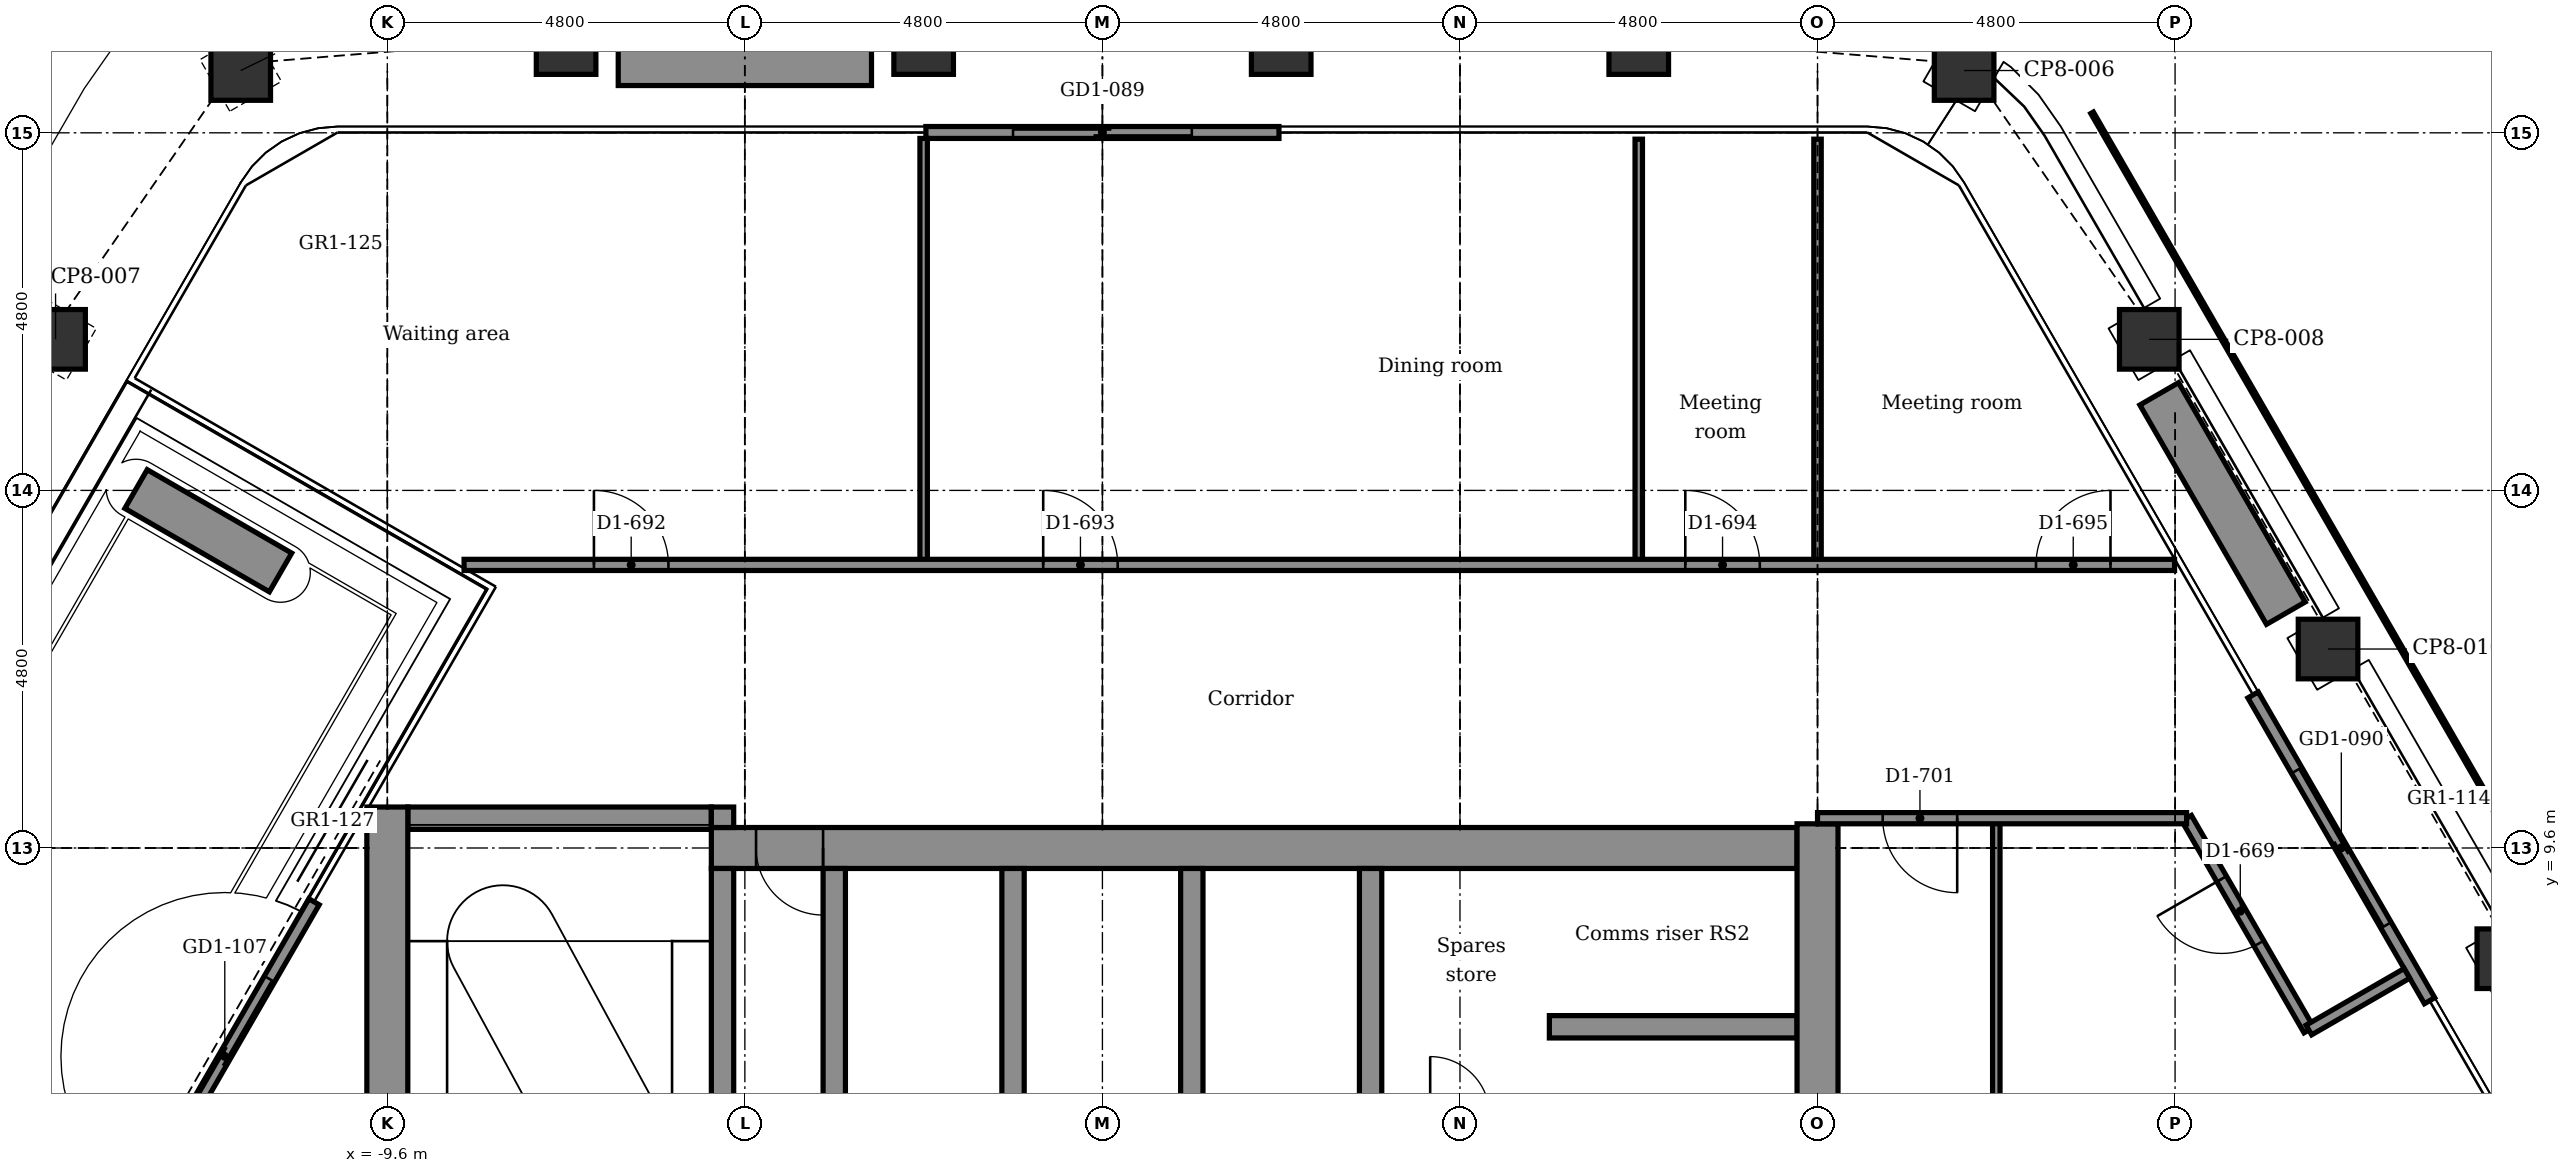
"""IFC4 building model, lengths in metres.
Left out: names, types, materials, properties, quantities, classifications, styles, units other than length and angle.
Written with IfcOpenShell. Run it as: python <this file> out.ifc"""

import sys

from ifc_helpers import new_model, si_unit, direction, frame, frame_2d, origin, origin_2d, place, context, subcontext, project, spatial, rectangle, extrude, element, fill, save


model = new_model("IFC4")
c1 = context("Model", 3, precision=1e-05, world=origin(), true_north=direction((0.0, 1.0)))
c2 = subcontext(c1, "Body", "Model", "MODEL_VIEW")
j1 = project(units=[si_unit("LENGTHUNIT", "METRE"), si_unit("PLANEANGLEUNIT", "RADIAN")], contexts=[c1])
p1 = place(None, origin())
s1 = spatial("IfcSite", under=j1, at=p1, CompositionType="ELEMENT")
p2 = place(p1, origin())
s2 = spatial("IfcBuilding", under=s1, at=p2, CompositionType="ELEMENT")
p3 = place(p2, frame((0.0, 0.0, 254.0)))
s3 = spatial("IfcBuildingStorey", under=s2, at=p3, CompositionType="ELEMENT", Elevation=254.0)
for number, where, z_axis, x_axis in (
    (1, (-11.568, 20.036, -0.15), (0.0, 0.0, 1.0), (0.866, 0.5, 0.0)),
    (2, (-7.2, 20.385, -0.15), (0.0, 0.0, 1.0), (1.0, 0.0, 0.0)),
    (3, (-2.4, 20.385, -0.15), (0.0, 0.0, 1.0), (1.0, 0.0, 0.0)),
    (4, (2.4, 20.385, -0.15), (0.0, 0.0, 1.0), (1.0, 0.0, 0.0)),
    (5, (7.2, 20.385, -0.15), (0.0, 0.0, 1.0), (1.0, 0.0, 0.0)),
    (6, (11.568, 20.036, -0.15), (0.0, 0.0, 1.0), (0.5, 0.866, 0.0)),
    (7, (14.054, 16.428, -0.15), (0.0, 0.0, 1.0), (0.866, 0.5, 0.0)),
    (8, (16.454, 12.271, -0.15), (0.0, 0.0, 1.0), (0.866, 0.5, 0.0)),
    (9, (18.854, 8.114, -0.15), (0.0, 0.0, 1.0), (0.866, 0.5, 0.0)),
    (10, (-14.054, 16.428, -0.15), (0.0, 0.0, 1.0), (0.5, 0.866, 0.0)),
):
    element("IfcColumn", number, at=place(p3, frame(where, z_axis=z_axis, x_axis=x_axis)), inside=s3, PredefinedType="COLUMN", context=c2, shape_type="SweptSolid", body=[
        extrude(rectangle(XDim=0.8, YDim=0.8, at=origin_2d()), origin(), (0.0, 0.0, 1.0), 3.9),
    ])
p4 = place(p3, frame((6.0, 7.2, -0.15), z_axis=(0.0, 0.0, 1.0), x_axis=(1.0, 0.0, 0.0)))
e11 = element("IfcWall", 11, at=p4, inside=s3, PredefinedType="STANDARD", context=c2, shape_type="SweptSolid", body=[
    extrude(rectangle(XDim=3.325, YDim=0.3, at=frame_2d((1.663, 0.0))), origin(), (0.0, 0.0, 1.0), 3.9),
])
p5 = place(p3, frame((-5.25, 9.6, -0.15), z_axis=(0.0, 0.0, 1.0), x_axis=(1.0, 0.0, 0.0)))
e12 = element("IfcWall", 12, at=p5, inside=s3, PredefinedType="SHEAR", context=c2, shape_type="SweptSolid", body=[
    extrude(rectangle(XDim=14.575, YDim=0.55, at=frame_2d((7.288, 0.0))), origin(), (0.0, 0.0, 1.0), 3.9),
])
p6 = place(p5, frame((0.6, 0.0, 0.15)))
e13 = element("IfcOpeningElement", 13, at=p6, cuts=e12, PredefinedType="OPENING", context=c2, shape_type="SweptSolid", body=[
    extrude(rectangle(XDim=0.9, YDim=2.1, at=frame_2d((0.45, 1.05))), frame((0.0, 0.285, 0.0), z_axis=(0.0, -1.0, 0.0), x_axis=(1.0, 0.0, 0.0)), (0.0, 0.0, 1.0), 0.57),
])
p7 = place(p3, frame((-9.325, 10.0, -0.15), z_axis=(0.0, 0.0, 1.0), x_axis=(1.0, 0.0, 0.0)))
e14 = element("IfcWall", 14, at=p7, inside=s3, PredefinedType="STANDARD", context=c2, shape_type="SweptSolid", body=[
    extrude(rectangle(XDim=4.075, YDim=0.3, at=frame_2d((2.038, 0.0))), origin(), (0.0, 0.0, 1.0), 3.9),
])
p8 = place(p3, frame((-9.6, 2.55, -0.15), z_axis=(0.0, 0.0, 1.0), x_axis=(0.0, 1.0, 0.0)))
e15 = element("IfcWall", 15, at=p8, inside=s3, PredefinedType="SHEAR", context=c2, shape_type="SweptSolid", body=[
    extrude(rectangle(XDim=7.6, YDim=0.55, at=frame_2d((3.8, 0.0))), origin(), (0.0, 0.0, 1.0), 3.9),
])
p9 = place(p3, frame((-5.1, 2.25, -0.15), z_axis=(0.0, 0.0, 1.0), x_axis=(0.0, 1.0, 0.0)))
e16 = element("IfcWall", 16, at=p9, inside=s3, PredefinedType="STANDARD", context=c2, shape_type="SweptSolid", body=[
    extrude(rectangle(XDim=7.075, YDim=0.3, at=frame_2d((3.538, 0.0))), origin(), (0.0, 0.0, 1.0), 3.9),
])
p10 = place(p9, frame((2.0, 0.0, 0.15)))
e17 = element("IfcOpeningElement", 17, at=p10, cuts=e16, PredefinedType="OPENING", context=c2, shape_type="SweptSolid", body=[
    extrude(rectangle(XDim=1.2, YDim=2.1, at=frame_2d((0.6, 1.05))), frame((0.0, 0.16, 0.0), z_axis=(0.0, -1.0, 0.0), x_axis=(1.0, 0.0, 0.0)), (0.0, 0.0, 1.0), 0.32),
])
p11 = place(p3, frame((-5.1, 9.875, -0.15), z_axis=(0.0, 0.0, 1.0), x_axis=(0.0, 1.0, 0.0)))
e18 = element("IfcWall", 18, at=p11, inside=s3, PredefinedType="STANDARD", context=c2, shape_type="SweptSolid", body=[
    extrude(rectangle(XDim=0.275, YDim=0.3, at=frame_2d((0.137, 0.0))), origin(), (0.0, 0.0, 1.0), 3.9),
])
for number, where, z_axis, x_axis in (
    (19, (-3.6, 5.85, -0.15), (0.0, 0.0, 1.0), (0.0, 1.0, 0.0)),
    (20, (-1.2, 5.85, -0.15), (0.0, 0.0, 1.0), (0.0, 1.0, 0.0)),
    (21, (1.2, 5.85, -0.15), (0.0, 0.0, 1.0), (0.0, 1.0, 0.0)),
    (22, (3.6, 5.85, -0.15), (0.0, 0.0, 1.0), (0.0, 1.0, 0.0)),
):
    element("IfcWall", number, at=place(p3, frame(where, z_axis=z_axis, x_axis=x_axis)), inside=s3, PredefinedType="STANDARD", context=c2, shape_type="SweptSolid", body=[
        extrude(rectangle(XDim=3.475, YDim=0.3, at=frame_2d((1.737, 0.0))), origin(), (0.0, 0.0, 1.0), 3.9),
    ])
p12 = place(p3, frame((9.6, -10.15, -0.15), z_axis=(0.0, 0.0, 1.0), x_axis=(0.0, 1.0, 0.0)))
e23 = element("IfcWall", 23, at=p12, inside=s3, PredefinedType="SHEAR", context=c2, shape_type="SweptSolid", body=[
    extrude(rectangle(XDim=20.075, YDim=0.55, at=frame_2d((10.038, 0.0))), origin(), (0.0, 0.0, 1.0), 3.9),
])
p13 = place(p3, frame((-2.37, 19.205, 0.0), z_axis=(0.0, 0.0, 1.0), x_axis=(1.0, 0.0, 0.0)))
e24 = element("IfcWall", 24, at=p13, inside=s3, PredefinedType="PARTITIONING", context=c2, shape_type="SweptSolid", body=[
    extrude(rectangle(XDim=4.74, YDim=0.16, at=frame_2d((2.37, 0.0))), origin(), (0.0, 0.0, 1.0), 3.75),
])
p14 = place(p13, frame((1.17, 0.0, 0.0)))
e25 = element("IfcOpeningElement", 25, at=p14, cuts=e24, PredefinedType="OPENING", context=c2, shape_type="SweptSolid", body=[
    extrude(rectangle(XDim=2.4, YDim=2.4, at=frame_2d((1.2, 1.2))), frame((0.0, 0.09, 0.0), z_axis=(0.0, -1.0, 0.0), x_axis=(1.0, 0.0, 0.0)), (0.0, 0.0, 1.0), 0.18),
])
p15 = place(p3, frame((15.447, 11.655, 0.0), z_axis=(0.0, 0.0, 1.0), x_axis=(0.499978080042, -0.866038058908, 0.0)))
e26 = element("IfcWall", 26, at=p15, inside=s3, PredefinedType="PARTITIONING", context=c2, shape_type="SweptSolid", body=[
    extrude(rectangle(XDim=4.74, YDim=0.16, at=frame_2d((2.37, 0.0))), origin(), (0.0, 0.0, 1.0), 3.75),
])
p16 = place(p15, frame((1.17, 0.0, 0.0)))
e27 = element("IfcOpeningElement", 27, at=p16, cuts=e26, PredefinedType="OPENING", context=c2, shape_type="SweptSolid", body=[
    extrude(rectangle(XDim=2.4, YDim=2.4, at=frame_2d((1.2, 1.2))), frame((0.0, 0.09, 0.0), z_axis=(0.0, -1.0, 0.0), x_axis=(1.0, 0.0, 0.0)), (0.0, 0.0, 1.0), 0.18),
])
p17 = place(p3, frame((-12.98, 4.727, 0.0), z_axis=(0.0, 0.0, 1.0), x_axis=(0.500011970786, 0.866018492338, 0.0)))
e28 = element("IfcWall", 28, at=p17, inside=s3, PredefinedType="PARTITIONING", context=c2, shape_type="SweptSolid", body=[
    extrude(rectangle(XDim=4.793, YDim=0.16, at=frame_2d((2.397, 0.0))), origin(), (0.0, 0.0, 1.0), 3.75),
])
p18 = place(p17, frame((1.197, 0.0, 0.0)))
e29 = element("IfcOpeningElement", 29, at=p18, cuts=e28, PredefinedType="OPENING", context=c2, shape_type="SweptSolid", body=[
    extrude(rectangle(XDim=2.4, YDim=2.4, at=frame_2d((1.2, 1.2))), frame((0.0, 0.09, 0.0), z_axis=(0.0, -1.0, 0.0), x_axis=(1.0, 0.0, 0.0)), (0.0, 0.0, 1.0), 0.18),
])
p19 = place(p3, frame((-6.5, 20.135, 0.0), z_axis=(0.0, 0.0, 1.0), x_axis=(1.0, 0.0, 0.0)))
e30 = element("IfcWall", 30, at=p19, inside=s3, PredefinedType="USERDEFINED", context=c2, shape_type="SweptSolid", body=[
    extrude(rectangle(XDim=3.4, YDim=0.6, at=frame_2d((1.7, 0.0))), origin(), (0.0, 0.0, 1.0), 0.7),
])
p20 = place(p3, frame((14.187, 15.697, 0.0), z_axis=(0.0, 0.0, 1.0), x_axis=(0.499977295307, -0.866038511948, 0.0)))
e31 = element("IfcWall", 31, at=p20, inside=s3, PredefinedType="USERDEFINED", context=c2, shape_type="SweptSolid", body=[
    extrude(rectangle(XDim=3.4, YDim=0.6, at=frame_2d((1.7, 0.0))), origin(), (0.0, 0.0, 1.0), 0.7),
])
p21 = place(p3, frame((-11.034, 13.298, 0.0), z_axis=(0.0, 0.0, 1.0), x_axis=(-0.865980463445, 0.500077830873, 0.0)))
e32 = element("IfcWall", 32, at=p21, inside=s3, PredefinedType="USERDEFINED", context=c2, shape_type="SweptSolid", body=[
    extrude(rectangle(XDim=2.24, YDim=0.6, at=frame_2d((1.12, 0.0))), origin(), (0.0, 0.0, 1.0), 0.7),
])
p22 = place(p3, frame((12.0, -10.0, 0.0), z_axis=(0.0, 0.0, 1.0), x_axis=(0.0, 1.0, 0.0)))
e33 = element("IfcWall", 33, at=p22, inside=s3, PredefinedType="PARTITIONING", context=c2, shape_type="SweptSolid", body=[
    extrude(rectangle(XDim=20.0, YDim=0.1, at=frame_2d((10.0, 0.0))), origin(), (0.0, 0.0, 1.0), 3.75),
])
p23 = place(p3, frame((9.6, 13.4, 0.0), z_axis=(0.0, 0.0, 1.0), x_axis=(0.0, 1.0, 0.0)))
e34 = element("IfcWall", 34, at=p23, inside=s3, PredefinedType="PARTITIONING", context=c2, shape_type="SweptSolid", body=[
    extrude(rectangle(XDim=5.715, YDim=0.1, at=frame_2d((2.857, 0.0))), origin(), (0.0, 0.0, 1.0), 3.217),
])
p24 = place(p3, frame((7.2, 13.4, 0.0), z_axis=(0.0, 0.0, 1.0), x_axis=(0.0, 1.0, 0.0)))
e35 = element("IfcWall", 35, at=p24, inside=s3, PredefinedType="PARTITIONING", context=c2, shape_type="SweptSolid", body=[
    extrude(rectangle(XDim=5.715, YDim=0.1, at=frame_2d((2.857, 0.0))), origin(), (0.0, 0.0, 1.0), 3.75),
])
p25 = place(p3, frame((-2.4, 13.4, 0.0), z_axis=(0.0, 0.0, 1.0), x_axis=(0.0, 1.0, 0.0)))
e36 = element("IfcWall", 36, at=p25, inside=s3, PredefinedType="PARTITIONING", context=c2, shape_type="SweptSolid", body=[
    extrude(rectangle(XDim=5.725, YDim=0.1, at=frame_2d((2.862, 0.0))), origin(), (0.0, 0.0, 1.0), 3.75),
])
p26 = place(p3, frame((14.555, 10.0, 0.0), z_axis=(0.0, 0.0, 1.0), x_axis=(0.499954196102, -0.866051847062, 0.0)))
e37 = element("IfcWall", 37, at=p26, inside=s3, PredefinedType="PARTITIONING", context=c2, shape_type="SweptSolid", body=[
    extrude(rectangle(XDim=3.283, YDim=0.15, at=frame_2d((1.642, 0.0))), origin(), (0.0, 0.0, 1.0), 3.75),
])
p27 = place(p26, frame((0.941, 0.0, 0.0)))
e38 = element("IfcOpeningElement", 38, at=p27, cuts=e37, PredefinedType="OPENING", context=c2, shape_type="SweptSolid", body=[
    extrude(rectangle(XDim=1.0, YDim=2.1, at=frame_2d((0.5, 1.05))), frame((0.0, 0.085, 0.0), z_axis=(0.0, -1.0, 0.0), x_axis=(1.0, 0.0, 0.0)), (0.0, 0.0, 1.0), 0.17),
])
p28 = place(p3, frame((16.196, 7.157, 0.0), z_axis=(0.0, 0.0, 1.0), x_axis=(0.865960906633, 0.500111695708, 0.0)))
e39 = element("IfcWall", 39, at=p28, inside=s3, PredefinedType="PARTITIONING", context=c2, shape_type="SweptSolid", body=[
    extrude(rectangle(XDim=1.52, YDim=0.15, at=frame_2d((0.76, 0.0))), origin(), (0.0, 0.0, 1.0), 3.75),
])
p29 = place(p3, frame((9.6, 10.0, 0.0), z_axis=(0.0, 0.0, 1.0), x_axis=(1.0, 0.0, 0.0)))
e40 = element("IfcWall", 40, at=p29, inside=s3, PredefinedType="PARTITIONING", context=c2, shape_type="SweptSolid", body=[
    extrude(rectangle(XDim=4.955, YDim=0.15, at=frame_2d((2.477, 0.0))), origin(), (0.0, 0.0, 1.0), 3.75),
])
p30 = place(p29, frame((0.875, 0.0, 0.0)))
e41 = element("IfcOpeningElement", 41, at=p30, cuts=e40, PredefinedType="OPENING", context=c2, shape_type="SweptSolid", body=[
    extrude(rectangle(XDim=1.0, YDim=2.1, at=frame_2d((0.5, 1.05))), frame((0.0, 0.085, 0.0), z_axis=(0.0, -1.0, 0.0), x_axis=(1.0, 0.0, 0.0)), (0.0, 0.0, 1.0), 0.17),
])
p31 = place(p3, frame((-8.57, 13.4, 0.0), z_axis=(0.0, 0.0, 1.0), x_axis=(1.0, 0.0, 0.0)))
e42 = element("IfcWall", 42, at=p31, inside=s3, PredefinedType="PARTITIONING", context=c2, shape_type="SweptSolid", body=[
    extrude(rectangle(XDim=22.962, YDim=0.15, at=frame_2d((11.481, 0.0))), origin(), (0.0, 0.0, 1.0), 3.75),
])
p32 = place(p31, frame((1.743, 0.0, 0.0)))
e43 = element("IfcOpeningElement", 43, at=p32, cuts=e42, PredefinedType="OPENING", context=c2, shape_type="SweptSolid", body=[
    extrude(rectangle(XDim=1.0, YDim=2.1, at=frame_2d((0.5, 1.05))), frame((0.0, 0.085, 0.0), z_axis=(0.0, -1.0, 0.0), x_axis=(1.0, 0.0, 0.0)), (0.0, 0.0, 1.0), 0.17),
])
p33 = place(p31, frame((7.774, 0.0, 0.0)))
e44 = element("IfcOpeningElement", 44, at=p33, cuts=e42, PredefinedType="OPENING", context=c2, shape_type="SweptSolid", body=[
    extrude(rectangle(XDim=1.0, YDim=2.1, at=frame_2d((0.5, 1.05))), frame((0.0, 0.085, 0.0), z_axis=(0.0, -1.0, 0.0), x_axis=(1.0, 0.0, 0.0)), (0.0, 0.0, 1.0), 0.17),
])
p34 = place(p31, frame((16.395, 0.0, 0.0)))
e45 = element("IfcOpeningElement", 45, at=p34, cuts=e42, PredefinedType="OPENING", context=c2, shape_type="SweptSolid", body=[
    extrude(rectangle(XDim=1.0, YDim=2.1, at=frame_2d((0.5, 1.05))), frame((0.0, 0.085, 0.0), z_axis=(0.0, -1.0, 0.0), x_axis=(1.0, 0.0, 0.0)), (0.0, 0.0, 1.0), 0.17),
])
p35 = place(p31, frame((21.102, 0.0, 0.0)))
e46 = element("IfcOpeningElement", 46, at=p35, cuts=e42, PredefinedType="OPENING", context=c2, shape_type="SweptSolid", body=[
    extrude(rectangle(XDim=1.0, YDim=2.1, at=frame_2d((0.5, 1.05))), frame((0.0, 0.085, 0.0), z_axis=(0.0, -1.0, 0.0), x_axis=(1.0, 0.0, 0.0)), (0.0, 0.0, 1.0), 0.17),
])
p36 = place(p14, origin())
e47 = element("IfcDoor", 47, at=p36, inside=s3, OperationType="DOUBLE_DOOR_SLIDING", PredefinedType="DOOR", context=c2, shape_type="SweptSolid", body=[
    extrude(rectangle(XDim=2.4, YDim=2.4, at=frame_2d((1.2, 1.2))), frame((0.0, 0.025, 0.0), z_axis=(0.0, -1.0, 0.0), x_axis=(1.0, 0.0, 0.0)), (0.0, 0.0, 1.0), 0.05),
])
fill(e25, e47)
p37 = place(p16, origin())
e48 = element("IfcDoor", 48, at=p37, inside=s3, OperationType="DOUBLE_DOOR_SLIDING", PredefinedType="DOOR", context=c2, shape_type="SweptSolid", body=[
    extrude(rectangle(XDim=2.4, YDim=2.4, at=frame_2d((1.2, 1.2))), frame((0.0, 0.025, 0.0), z_axis=(0.0, -1.0, 0.0), x_axis=(1.0, 0.0, 0.0)), (0.0, 0.0, 1.0), 0.05),
])
fill(e27, e48)
p38 = place(p18, origin())
e49 = element("IfcDoor", 49, at=p38, inside=s3, OperationType="DOUBLE_DOOR_SLIDING", PredefinedType="DOOR", context=c2, shape_type="SweptSolid", body=[
    extrude(rectangle(XDim=2.4, YDim=2.4, at=frame_2d((1.2, 1.2))), frame((0.0, 0.025, 0.0), z_axis=(0.0, -1.0, 0.0), x_axis=(1.0, 0.0, 0.0)), (0.0, 0.0, 1.0), 0.05),
])
fill(e29, e49)
p39 = place(p32, origin())
e50 = element("IfcDoor", 50, at=p39, inside=s3, OperationType="SINGLE_SWING_LEFT", PredefinedType="DOOR", context=c2, shape_type="SweptSolid", body=[
    extrude(rectangle(XDim=1.0, YDim=2.1, at=frame_2d((0.5, 1.05))), frame((0.0, 0.025, 0.0), z_axis=(0.0, -1.0, 0.0), x_axis=(1.0, 0.0, 0.0)), (0.0, 0.0, 1.0), 0.05),
])
fill(e43, e50)
p40 = place(p33, origin())
e51 = element("IfcDoor", 51, at=p40, inside=s3, OperationType="SINGLE_SWING_LEFT", PredefinedType="DOOR", context=c2, shape_type="SweptSolid", body=[
    extrude(rectangle(XDim=1.0, YDim=2.1, at=frame_2d((0.5, 1.05))), frame((0.0, 0.025, 0.0), z_axis=(0.0, -1.0, 0.0), x_axis=(1.0, 0.0, 0.0)), (0.0, 0.0, 1.0), 0.05),
])
fill(e44, e51)
p41 = place(p34, origin())
e52 = element("IfcDoor", 52, at=p41, inside=s3, OperationType="SINGLE_SWING_LEFT", PredefinedType="DOOR", context=c2, shape_type="SweptSolid", body=[
    extrude(rectangle(XDim=1.0, YDim=2.1, at=frame_2d((0.5, 1.05))), frame((0.0, 0.025, 0.0), z_axis=(0.0, -1.0, 0.0), x_axis=(1.0, 0.0, 0.0)), (0.0, 0.0, 1.0), 0.05),
])
fill(e45, e52)
p42 = place(p35, origin())
e53 = element("IfcDoor", 53, at=p42, inside=s3, OperationType="SINGLE_SWING_RIGHT", PredefinedType="DOOR", context=c2, shape_type="SweptSolid", body=[
    extrude(rectangle(XDim=1.0, YDim=2.1, at=frame_2d((0.5, 1.05))), frame((0.0, 0.025, 0.0), z_axis=(0.0, -1.0, 0.0), x_axis=(1.0, 0.0, 0.0)), (0.0, 0.0, 1.0), 0.05),
])
fill(e46, e53)
p43 = place(p30, frame((1.0, 0.0, 0.0), z_axis=(0.0, 0.0, 1.0), x_axis=(-1.0, 0.0, 0.0)))
e54 = element("IfcDoor", 54, at=p43, inside=s3, OperationType="SINGLE_SWING_RIGHT", PredefinedType="DOOR", context=c2, shape_type="SweptSolid", body=[
    extrude(rectangle(XDim=1.0, YDim=2.1, at=frame_2d((0.5, 1.05))), frame((0.0, 0.025, 0.0), z_axis=(0.0, -1.0, 0.0), x_axis=(1.0, 0.0, 0.0)), (0.0, 0.0, 1.0), 0.05),
])
fill(e41, e54)
p44 = place(p27, frame((1.0, 0.0, 0.0), z_axis=(0.0, 0.0, 1.0), x_axis=(-1.0, 0.0, 0.0)))
e55 = element("IfcDoor", 55, at=p44, inside=s3, OperationType="SINGLE_SWING_LEFT", PredefinedType="DOOR", context=c2, shape_type="SweptSolid", body=[
    extrude(rectangle(XDim=1.0, YDim=2.1, at=frame_2d((0.5, 1.05))), frame((0.0, 0.025, 0.0), z_axis=(0.0, -1.0, 0.0), x_axis=(1.0, 0.0, 0.0)), (0.0, 0.0, 1.0), 0.05),
])
fill(e38, e55)
p45 = place(p6, frame((0.9, 0.0, 0.0), z_axis=(0.0, 0.0, 1.0), x_axis=(-1.0, 0.0, 0.0)))
e56 = element("IfcDoor", 56, at=p45, inside=s3, OperationType="SINGLE_SWING_RIGHT", PredefinedType="DOOR", context=c2, shape_type="SweptSolid", body=[
    extrude(rectangle(XDim=0.9, YDim=2.1, at=frame_2d((0.45, 1.05))), frame((0.0, 0.025, 0.0), z_axis=(0.0, -1.0, 0.0), x_axis=(1.0, 0.0, 0.0)), (0.0, 0.0, 1.0), 0.05),
])
fill(e13, e56)
save(model, sys.argv[1])
